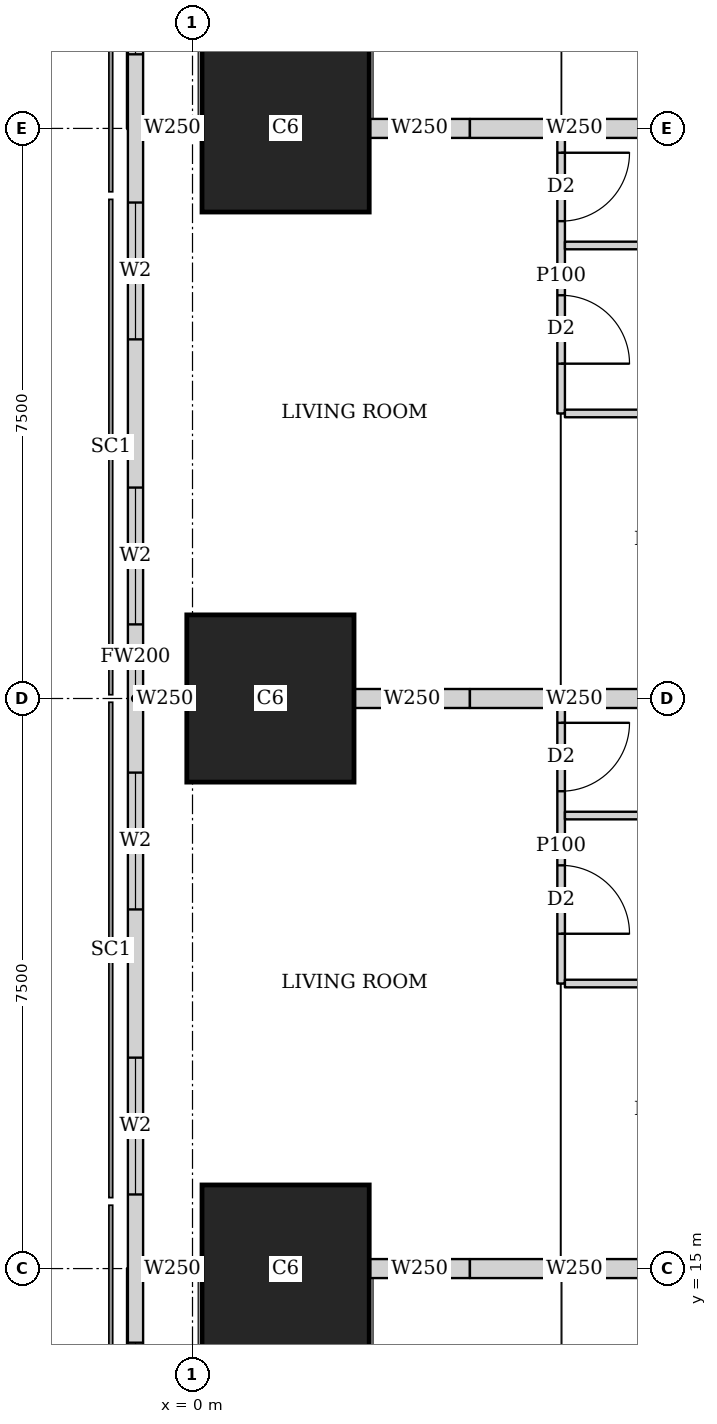
"""IFC4 building model, lengths in metres.
Left out: names, types, materials, properties, quantities, classifications, styles, units other than length and angle.
Written with IfcOpenShell. Run it as: python <this file> out.ifc"""

import sys

from ifc_helpers import new_model, si_unit, direction, frame, frame_2d, origin, origin_2d, place, context, subcontext, project, spatial, rectangle, extrude, element, fill, save


model = new_model("IFC4")
c1 = context("Model", 3, precision=1e-05, world=origin(), true_north=direction((0.0, 1.0)))
c2 = subcontext(c1, "Body", "Model", "MODEL_VIEW")
j1 = project(units=[si_unit("LENGTHUNIT", "METRE"), si_unit("PLANEANGLEUNIT", "RADIAN")], contexts=[c1])
p1 = place(None, origin())
s1 = spatial("IfcSite", under=j1, at=p1, CompositionType="ELEMENT")
p2 = place(p1, origin())
s2 = spatial("IfcBuilding", under=s1, at=p2, CompositionType="ELEMENT")
p3 = place(p2, frame((0.0, 0.0, 122.9)))
s3 = spatial("IfcBuildingStorey", under=s2, at=p3, CompositionType="ELEMENT", Elevation=122.9)
for number, where, z_axis, x_axis in (
    (1, (1.225, 15.0, 0.0), (0.0, 0.0, 1.0), (1.0, 0.0, 0.0)),
    (2, (1.025, 22.5, 0.0), (0.0, 0.0, 1.0), (1.0, 0.0, 0.0)),
    (3, (1.225, 30.0, 0.0), (0.0, 0.0, 1.0), (1.0, 0.0, 0.0)),
):
    element("IfcColumn", number, at=place(p3, frame(where, z_axis=z_axis, x_axis=x_axis)), inside=s3, PredefinedType="COLUMN", context=c2, shape_type="SweptSolid", body=[
        extrude(rectangle(XDim=2.2, YDim=2.2, at=origin_2d()), origin(), (0.0, 0.0, 1.0), 3.75),
    ])
p4 = place(p3, frame((-0.75, 42.837, 0.0), z_axis=(0.0, 0.0, 1.0), x_axis=(0.0, -1.0, 0.0)))
e4 = element("IfcWall", 4, at=p4, inside=s3, PredefinedType="SOLIDWALL", context=c2, shape_type="SweptSolid", body=[
    extrude(rectangle(XDim=40.674, YDim=0.2, at=frame_2d((20.337, 0.0))), origin(), (0.0, 0.0, 1.0), 3.5),
])
p5 = place(p4, frame((1.78, 0.0, 0.9)))
e5 = element("IfcOpeningElement", 5, at=p5, cuts=e4, PredefinedType="OPENING", context=c2, shape_type="SweptSolid", body=[
    extrude(rectangle(XDim=1.8, YDim=1.5, at=frame_2d((0.9, 0.75))), frame((0.0, 0.11, 0.0), z_axis=(0.0, -1.0, 0.0), x_axis=(1.0, 0.0, 0.0)), (0.0, 0.0, 1.0), 0.22),
])
p6 = place(p4, frame((6.312, 0.0, 0.9)))
e6 = element("IfcOpeningElement", 6, at=p6, cuts=e4, PredefinedType="OPENING", context=c2, shape_type="SweptSolid", body=[
    extrude(rectangle(XDim=1.8, YDim=1.5, at=frame_2d((0.9, 0.75))), frame((0.0, 0.11, 0.0), z_axis=(0.0, -1.0, 0.0), x_axis=(1.0, 0.0, 0.0)), (0.0, 0.0, 1.0), 0.22),
])
p7 = place(p4, frame((10.062, 0.0, 0.9)))
e7 = element("IfcOpeningElement", 7, at=p7, cuts=e4, PredefinedType="OPENING", context=c2, shape_type="SweptSolid", body=[
    extrude(rectangle(XDim=1.8, YDim=1.5, at=frame_2d((0.9, 0.75))), frame((0.0, 0.11, 0.0), z_axis=(0.0, -1.0, 0.0), x_axis=(1.0, 0.0, 0.0)), (0.0, 0.0, 1.0), 0.22),
])
p8 = place(p4, frame((13.812, 0.0, 0.9)))
e8 = element("IfcOpeningElement", 8, at=p8, cuts=e4, PredefinedType="OPENING", context=c2, shape_type="SweptSolid", body=[
    extrude(rectangle(XDim=1.8, YDim=1.5, at=frame_2d((0.9, 0.75))), frame((0.0, 0.11, 0.0), z_axis=(0.0, -1.0, 0.0), x_axis=(1.0, 0.0, 0.0)), (0.0, 0.0, 1.0), 0.22),
])
p9 = place(p4, frame((17.562, 0.0, 0.9)))
e9 = element("IfcOpeningElement", 9, at=p9, cuts=e4, PredefinedType="OPENING", context=c2, shape_type="SweptSolid", body=[
    extrude(rectangle(XDim=1.8, YDim=1.5, at=frame_2d((0.9, 0.75))), frame((0.0, 0.11, 0.0), z_axis=(0.0, -1.0, 0.0), x_axis=(1.0, 0.0, 0.0)), (0.0, 0.0, 1.0), 0.22),
])
p10 = place(p4, frame((21.312, 0.0, 0.9)))
e10 = element("IfcOpeningElement", 10, at=p10, cuts=e4, PredefinedType="OPENING", context=c2, shape_type="SweptSolid", body=[
    extrude(rectangle(XDim=1.8, YDim=1.5, at=frame_2d((0.9, 0.75))), frame((0.0, 0.11, 0.0), z_axis=(0.0, -1.0, 0.0), x_axis=(1.0, 0.0, 0.0)), (0.0, 0.0, 1.0), 0.22),
])
p11 = place(p4, frame((25.062, 0.0, 0.9)))
e11 = element("IfcOpeningElement", 11, at=p11, cuts=e4, PredefinedType="OPENING", context=c2, shape_type="SweptSolid", body=[
    extrude(rectangle(XDim=1.8, YDim=1.5, at=frame_2d((0.9, 0.75))), frame((0.0, 0.11, 0.0), z_axis=(0.0, -1.0, 0.0), x_axis=(1.0, 0.0, 0.0)), (0.0, 0.0, 1.0), 0.22),
])
p12 = place(p4, frame((28.812, 0.0, 0.9)))
e12 = element("IfcOpeningElement", 12, at=p12, cuts=e4, PredefinedType="OPENING", context=c2, shape_type="SweptSolid", body=[
    extrude(rectangle(XDim=1.8, YDim=1.5, at=frame_2d((0.9, 0.75))), frame((0.0, 0.11, 0.0), z_axis=(0.0, -1.0, 0.0), x_axis=(1.0, 0.0, 0.0)), (0.0, 0.0, 1.0), 0.22),
])
p13 = place(p4, frame((32.562, 0.0, 0.9)))
e13 = element("IfcOpeningElement", 13, at=p13, cuts=e4, PredefinedType="OPENING", context=c2, shape_type="SweptSolid", body=[
    extrude(rectangle(XDim=1.8, YDim=1.5, at=frame_2d((0.9, 0.75))), frame((0.0, 0.11, 0.0), z_axis=(0.0, -1.0, 0.0), x_axis=(1.0, 0.0, 0.0)), (0.0, 0.0, 1.0), 0.22),
])
p14 = place(p4, frame((37.094, 0.0, 0.9)))
e14 = element("IfcOpeningElement", 14, at=p14, cuts=e4, PredefinedType="OPENING", context=c2, shape_type="SweptSolid", body=[
    extrude(rectangle(XDim=1.8, YDim=1.5, at=frame_2d((0.9, 0.75))), frame((0.0, 0.11, 0.0), z_axis=(0.0, -1.0, 0.0), x_axis=(1.0, 0.0, 0.0)), (0.0, 0.0, 1.0), 0.22),
])
p15 = place(p3, frame((4.85, 18.75, 0.0), z_axis=(0.0, 0.0, 1.0), x_axis=(0.0, 1.0, 0.0)))
e15 = element("IfcWall", 15, at=p15, inside=s3, PredefinedType="PARTITIONING", context=c2, shape_type="SweptSolid", body=[
    extrude(rectangle(XDim=3.625, YDim=0.1, at=frame_2d((1.812, 0.0))), origin(), (0.0, 0.0, 1.0), 3.5),
])
p16 = place(p15, frame((0.655, 0.0, 0.0)))
e16 = element("IfcOpeningElement", 16, at=p16, cuts=e15, PredefinedType="OPENING", context=c2, shape_type="SweptSolid", body=[
    extrude(rectangle(XDim=0.9, YDim=2.1, at=frame_2d((0.45, 1.05))), frame((0.0, 0.06, 0.0), z_axis=(0.0, -1.0, 0.0), x_axis=(1.0, 0.0, 0.0)), (0.0, 0.0, 1.0), 0.12),
])
p17 = place(p15, frame((2.53, 0.0, 0.0)))
e17 = element("IfcOpeningElement", 17, at=p17, cuts=e15, PredefinedType="OPENING", context=c2, shape_type="SweptSolid", body=[
    extrude(rectangle(XDim=0.9, YDim=2.1, at=frame_2d((0.45, 1.05))), frame((0.0, 0.06, 0.0), z_axis=(0.0, -1.0, 0.0), x_axis=(1.0, 0.0, 0.0)), (0.0, 0.0, 1.0), 0.12),
])
for number, where, z_axis, x_axis in (
    (18, (4.9, 18.75, 0.0), (0.0, 0.0, 1.0), (1.0, 0.0, 0.0)),
    (19, (4.9, 20.96, 0.0), (0.0, 0.0, 1.0), (1.0, 0.0, 0.0)),
):
    element("IfcWall", number, at=place(p3, frame(where, z_axis=z_axis, x_axis=x_axis)), inside=s3, PredefinedType="PARTITIONING", context=c2, shape_type="SweptSolid", body=[
        extrude(rectangle(XDim=3.275, YDim=0.1, at=frame_2d((1.638, 0.0))), origin(), (0.0, 0.0, 1.0), 3.5),
    ])
p18 = place(p3, frame((-0.65, 15.0, 0.0), z_axis=(0.0, 0.0, 1.0), x_axis=(1.0, 0.0, 0.0)))
e20 = element("IfcWall", 20, at=p18, inside=s3, PredefinedType="SOLIDWALL", context=c2, shape_type="SweptSolid", body=[
    extrude(rectangle(XDim=0.774, YDim=0.25, at=frame_2d((0.387, 0.0))), origin(), (0.0, 0.0, 1.0), 3.5),
])
p19 = place(p3, frame((2.326, 15.0, 0.0), z_axis=(0.0, 0.0, 1.0), x_axis=(1.0, 0.0, 0.0)))
e21 = element("IfcWall", 21, at=p19, inside=s3, PredefinedType="SOLIDWALL", context=c2, shape_type="SweptSolid", body=[
    extrude(rectangle(XDim=1.324, YDim=0.25, at=frame_2d((0.662, 0.0))), origin(), (0.0, 0.0, 1.0), 3.5),
])
p20 = place(p3, frame((3.65, 15.0, 0.0), z_axis=(0.0, 0.0, 1.0), x_axis=(1.0, 0.0, 0.0)))
e22 = element("IfcWall", 22, at=p20, inside=s3, PredefinedType="SOLIDWALL", context=c2, shape_type="SweptSolid", body=[
    extrude(rectangle(XDim=2.749, YDim=0.25, at=frame_2d((1.375, 0.0))), origin(), (0.0, 0.0, 1.0), 3.5),
])
p21 = place(p3, frame((4.85, 26.25, 0.0), z_axis=(0.0, 0.0, 1.0), x_axis=(0.0, 1.0, 0.0)))
e23 = element("IfcWall", 23, at=p21, inside=s3, PredefinedType="PARTITIONING", context=c2, shape_type="SweptSolid", body=[
    extrude(rectangle(XDim=3.625, YDim=0.1, at=frame_2d((1.812, 0.0))), origin(), (0.0, 0.0, 1.0), 3.5),
])
p22 = place(p21, frame((0.655, 0.0, 0.0)))
e24 = element("IfcOpeningElement", 24, at=p22, cuts=e23, PredefinedType="OPENING", context=c2, shape_type="SweptSolid", body=[
    extrude(rectangle(XDim=0.9, YDim=2.1, at=frame_2d((0.45, 1.05))), frame((0.0, 0.06, 0.0), z_axis=(0.0, -1.0, 0.0), x_axis=(1.0, 0.0, 0.0)), (0.0, 0.0, 1.0), 0.12),
])
p23 = place(p21, frame((2.53, 0.0, 0.0)))
e25 = element("IfcOpeningElement", 25, at=p23, cuts=e23, PredefinedType="OPENING", context=c2, shape_type="SweptSolid", body=[
    extrude(rectangle(XDim=0.9, YDim=2.1, at=frame_2d((0.45, 1.05))), frame((0.0, 0.06, 0.0), z_axis=(0.0, -1.0, 0.0), x_axis=(1.0, 0.0, 0.0)), (0.0, 0.0, 1.0), 0.12),
])
for number, where, z_axis, x_axis in (
    (26, (4.9, 26.25, 0.0), (0.0, 0.0, 1.0), (1.0, 0.0, 0.0)),
    (27, (4.9, 28.46, 0.0), (0.0, 0.0, 1.0), (1.0, 0.0, 0.0)),
):
    element("IfcWall", number, at=place(p3, frame(where, z_axis=z_axis, x_axis=x_axis)), inside=s3, PredefinedType="PARTITIONING", context=c2, shape_type="SweptSolid", body=[
        extrude(rectangle(XDim=3.275, YDim=0.1, at=frame_2d((1.638, 0.0))), origin(), (0.0, 0.0, 1.0), 3.5),
    ])
p24 = place(p3, frame((-0.65, 22.5, 0.0), z_axis=(0.0, 0.0, 1.0), x_axis=(1.0, 0.0, 0.0)))
e28 = element("IfcWall", 28, at=p24, inside=s3, PredefinedType="SOLIDWALL", context=c2, shape_type="SweptSolid", body=[
    extrude(rectangle(XDim=0.574, YDim=0.25, at=frame_2d((0.287, 0.0))), origin(), (0.0, 0.0, 1.0), 3.5),
])
p25 = place(p3, frame((2.126, 22.5, 0.0), z_axis=(0.0, 0.0, 1.0), x_axis=(1.0, 0.0, 0.0)))
e29 = element("IfcWall", 29, at=p25, inside=s3, PredefinedType="SOLIDWALL", context=c2, shape_type="SweptSolid", body=[
    extrude(rectangle(XDim=1.524, YDim=0.25, at=frame_2d((0.762, 0.0))), origin(), (0.0, 0.0, 1.0), 3.5),
])
p26 = place(p3, frame((3.65, 22.5, 0.0), z_axis=(0.0, 0.0, 1.0), x_axis=(1.0, 0.0, 0.0)))
e30 = element("IfcWall", 30, at=p26, inside=s3, PredefinedType="SOLIDWALL", context=c2, shape_type="SweptSolid", body=[
    extrude(rectangle(XDim=2.749, YDim=0.25, at=frame_2d((1.375, 0.0))), origin(), (0.0, 0.0, 1.0), 3.5),
])
p27 = place(p3, frame((-0.65, 30.0, 0.0), z_axis=(0.0, 0.0, 1.0), x_axis=(1.0, 0.0, 0.0)))
e31 = element("IfcWall", 31, at=p27, inside=s3, PredefinedType="SOLIDWALL", context=c2, shape_type="SweptSolid", body=[
    extrude(rectangle(XDim=0.774, YDim=0.25, at=frame_2d((0.387, 0.0))), origin(), (0.0, 0.0, 1.0), 3.5),
])
p28 = place(p3, frame((2.326, 30.0, 0.0), z_axis=(0.0, 0.0, 1.0), x_axis=(1.0, 0.0, 0.0)))
e32 = element("IfcWall", 32, at=p28, inside=s3, PredefinedType="SOLIDWALL", context=c2, shape_type="SweptSolid", body=[
    extrude(rectangle(XDim=1.324, YDim=0.25, at=frame_2d((0.662, 0.0))), origin(), (0.0, 0.0, 1.0), 3.5),
])
p29 = place(p3, frame((3.65, 30.0, 0.0), z_axis=(0.0, 0.0, 1.0), x_axis=(1.0, 0.0, 0.0)))
e33 = element("IfcWall", 33, at=p29, inside=s3, PredefinedType="SOLIDWALL", context=c2, shape_type="SweptSolid", body=[
    extrude(rectangle(XDim=2.749, YDim=0.25, at=frame_2d((1.375, 0.0))), origin(), (0.0, 0.0, 1.0), 3.5),
])
p30 = place(p7, origin())
e34 = element("IfcWindow", 34, at=p30, inside=s3, PartitioningType="SINGLE_PANEL", PredefinedType="WINDOW", context=c2, shape_type="SweptSolid", body=[
    extrude(rectangle(XDim=1.8, YDim=1.5, at=frame_2d((0.9, 0.75))), frame((0.0, 0.03, 0.0), z_axis=(0.0, -1.0, 0.0), x_axis=(1.0, 0.0, 0.0)), (0.0, 0.0, 1.0), 0.06),
])
fill(e7, e34)
p31 = place(p8, origin())
e35 = element("IfcWindow", 35, at=p31, inside=s3, PartitioningType="SINGLE_PANEL", PredefinedType="WINDOW", context=c2, shape_type="SweptSolid", body=[
    extrude(rectangle(XDim=1.8, YDim=1.5, at=frame_2d((0.9, 0.75))), frame((0.0, 0.03, 0.0), z_axis=(0.0, -1.0, 0.0), x_axis=(1.0, 0.0, 0.0)), (0.0, 0.0, 1.0), 0.06),
])
fill(e8, e35)
p32 = place(p9, origin())
e36 = element("IfcWindow", 36, at=p32, inside=s3, PartitioningType="SINGLE_PANEL", PredefinedType="WINDOW", context=c2, shape_type="SweptSolid", body=[
    extrude(rectangle(XDim=1.8, YDim=1.5, at=frame_2d((0.9, 0.75))), frame((0.0, 0.03, 0.0), z_axis=(0.0, -1.0, 0.0), x_axis=(1.0, 0.0, 0.0)), (0.0, 0.0, 1.0), 0.06),
])
fill(e9, e36)
p33 = place(p10, origin())
e37 = element("IfcWindow", 37, at=p33, inside=s3, PartitioningType="SINGLE_PANEL", PredefinedType="WINDOW", context=c2, shape_type="SweptSolid", body=[
    extrude(rectangle(XDim=1.8, YDim=1.5, at=frame_2d((0.9, 0.75))), frame((0.0, 0.03, 0.0), z_axis=(0.0, -1.0, 0.0), x_axis=(1.0, 0.0, 0.0)), (0.0, 0.0, 1.0), 0.06),
])
fill(e10, e37)
p34 = place(p11, origin())
e38 = element("IfcWindow", 38, at=p34, inside=s3, PartitioningType="SINGLE_PANEL", PredefinedType="WINDOW", context=c2, shape_type="SweptSolid", body=[
    extrude(rectangle(XDim=1.8, YDim=1.5, at=frame_2d((0.9, 0.75))), frame((0.0, 0.03, 0.0), z_axis=(0.0, -1.0, 0.0), x_axis=(1.0, 0.0, 0.0)), (0.0, 0.0, 1.0), 0.06),
])
fill(e11, e38)
p35 = place(p12, origin())
e39 = element("IfcWindow", 39, at=p35, inside=s3, PartitioningType="SINGLE_PANEL", PredefinedType="WINDOW", context=c2, shape_type="SweptSolid", body=[
    extrude(rectangle(XDim=1.8, YDim=1.5, at=frame_2d((0.9, 0.75))), frame((0.0, 0.03, 0.0), z_axis=(0.0, -1.0, 0.0), x_axis=(1.0, 0.0, 0.0)), (0.0, 0.0, 1.0), 0.06),
])
fill(e12, e39)
p36 = place(p16, origin())
e40 = element("IfcDoor", 40, at=p36, inside=s3, OperationType="SINGLE_SWING_RIGHT", PredefinedType="DOOR", context=c2, shape_type="SweptSolid", body=[
    extrude(rectangle(XDim=0.9, YDim=2.1, at=frame_2d((0.45, 1.05))), frame((0.0, 0.025, 0.0), z_axis=(0.0, -1.0, 0.0), x_axis=(1.0, 0.0, 0.0)), (0.0, 0.0, 1.0), 0.05),
])
fill(e16, e40)
p37 = place(p17, origin())
e41 = element("IfcDoor", 41, at=p37, inside=s3, OperationType="SINGLE_SWING_LEFT", PredefinedType="DOOR", context=c2, shape_type="SweptSolid", body=[
    extrude(rectangle(XDim=0.9, YDim=2.1, at=frame_2d((0.45, 1.05))), frame((0.0, 0.025, 0.0), z_axis=(0.0, -1.0, 0.0), x_axis=(1.0, 0.0, 0.0)), (0.0, 0.0, 1.0), 0.05),
])
fill(e17, e41)
p38 = place(p22, origin())
e42 = element("IfcDoor", 42, at=p38, inside=s3, OperationType="SINGLE_SWING_RIGHT", PredefinedType="DOOR", context=c2, shape_type="SweptSolid", body=[
    extrude(rectangle(XDim=0.9, YDim=2.1, at=frame_2d((0.45, 1.05))), frame((0.0, 0.025, 0.0), z_axis=(0.0, -1.0, 0.0), x_axis=(1.0, 0.0, 0.0)), (0.0, 0.0, 1.0), 0.05),
])
fill(e24, e42)
p39 = place(p23, origin())
e43 = element("IfcDoor", 43, at=p39, inside=s3, OperationType="SINGLE_SWING_LEFT", PredefinedType="DOOR", context=c2, shape_type="SweptSolid", body=[
    extrude(rectangle(XDim=0.9, YDim=2.1, at=frame_2d((0.45, 1.05))), frame((0.0, 0.025, 0.0), z_axis=(0.0, -1.0, 0.0), x_axis=(1.0, 0.0, 0.0)), (0.0, 0.0, 1.0), 0.05),
])
fill(e25, e43)
save(model, sys.argv[1])
